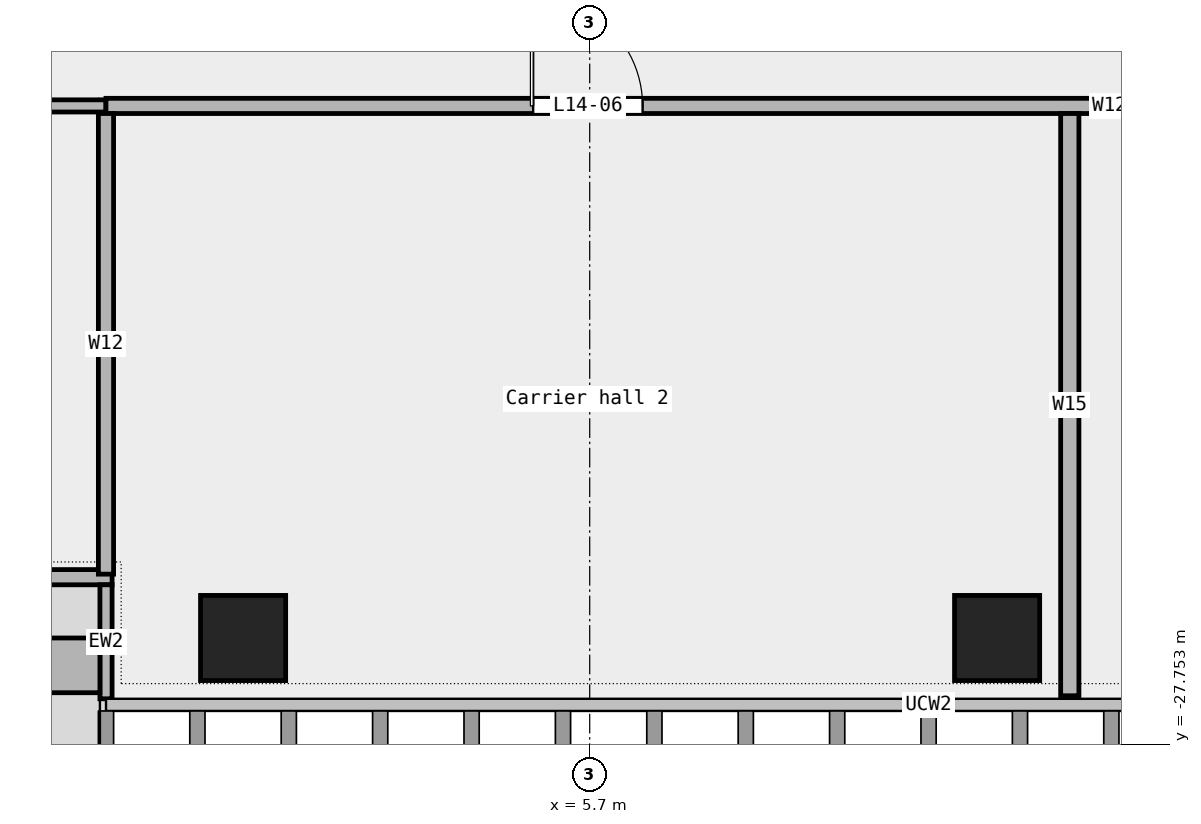
"""IFC4 building model, lengths in metres.
Left out: names, types, materials, properties, quantities, classifications, styles, units other than length and angle.
Written with IfcOpenShell. Run it as: python <this file> out.ifc"""

import sys

from ifc_helpers import new_model, si_unit, direction, frame, frame_2d, origin, origin_2d, place, context, subcontext, project, spatial, rectangle, extrude, element, fill, save


model = new_model("IFC4")
c1 = context("Model", 3, precision=1e-05, world=origin(), true_north=direction((0.0, 1.0)))
c2 = subcontext(c1, "Body", "Model", "MODEL_VIEW")
j1 = project(units=[si_unit("LENGTHUNIT", "METRE"), si_unit("PLANEANGLEUNIT", "RADIAN")], contexts=[c1])
p1 = place(None, origin())
s1 = spatial("IfcSite", under=j1, at=p1, CompositionType="ELEMENT")
p2 = place(p1, origin())
s2 = spatial("IfcBuilding", under=s1, at=p2, CompositionType="ELEMENT")
p3 = place(p2, frame((0.0, 0.0, 74.2)))
s3 = spatial("IfcBuildingStorey", under=s2, at=p3, CompositionType="ELEMENT", Elevation=74.2)
for number, where, z_axis, x_axis in (
    (1, (0.0, -26.0, 0.0), (0.0, 0.0, 1.0), (1.0, 0.0, 0.0)),
    (2, (12.4, -26.0, 0.0), (0.0, 0.0, 1.0), (1.0, 0.0, 0.0)),
):
    element("IfcColumn", number, at=place(p3, frame(where, z_axis=z_axis, x_axis=x_axis)), inside=s3, PredefinedType="COLUMN", context=c2, shape_type="SweptSolid", body=[
        extrude(rectangle(XDim=1.4, YDim=1.4, at=origin_2d()), origin(), (0.0, 0.0, 1.0), 4.35),
    ])
p4 = place(p3, frame((-15.882, -25.0, 0.0), z_axis=(0.0, 0.0, 1.0), x_axis=(1.0, 0.0, 0.0)))
e3 = element("IfcWall", 3, at=p4, inside=s3, PredefinedType="STANDARD", context=c2, shape_type="SweptSolid", body=[
    extrude(rectangle(XDim=13.727, YDim=0.25, at=frame_2d((6.864, 0.0))), origin(), (0.0, 0.0, 1.0), 4.35),
])
p5 = place(p4, frame((1.0, 0.0, 0.45)))
e4 = element("IfcOpeningElement", 4, at=p5, cuts=e3, PredefinedType="OPENING", context=c2, shape_type="SweptSolid", body=[
    extrude(rectangle(XDim=1.5, YDim=3.0, at=frame_2d((0.75, 1.5))), frame((0.0, 0.137, 0.0), z_axis=(0.0, -1.0, 0.0), x_axis=(1.0, 0.0, 0.0)), (0.0, 0.0, 1.0), 0.274),
])
p6 = place(p4, frame((6.0, 0.0, 0.0)))
e5 = element("IfcOpeningElement", 5, at=p6, cuts=e3, PredefinedType="OPENING", context=c2, shape_type="SweptSolid", body=[
    extrude(rectangle(XDim=1.8, YDim=2.4, at=frame_2d((0.9, 1.2))), frame((0.0, 0.137, 0.0), z_axis=(0.0, -1.0, 0.0), x_axis=(1.0, 0.0, 0.0)), (0.0, 0.0, 1.0), 0.274),
])
p7 = place(p4, frame((10.5, 0.0, 0.45)))
e6 = element("IfcOpeningElement", 6, at=p7, cuts=e3, PredefinedType="OPENING", context=c2, shape_type="SweptSolid", body=[
    extrude(rectangle(XDim=1.5, YDim=3.0, at=frame_2d((0.75, 1.5))), frame((0.0, 0.137, 0.0), z_axis=(0.0, -1.0, 0.0), x_axis=(1.0, 0.0, 0.0)), (0.0, 0.0, 1.0), 0.274),
])
p8 = place(p3, frame((-2.255, -27.0, 0.0), z_axis=(0.0, 0.0, 1.0), x_axis=(0.0, 1.0, 0.0)))
e7 = element("IfcWall", 7, at=p8, inside=s3, PredefinedType="STANDARD", context=c2, shape_type="SweptSolid", body=[
    extrude(rectangle(XDim=1.875, YDim=0.2, at=frame_2d((0.938, 0.0))), origin(), (0.0, 0.0, 1.0), 4.35),
])
p9 = place(p3, frame((-5.955, -26.45, 0.0), z_axis=(0.0, 0.0, 1.0), x_axis=(1.0, 0.0, 0.0)))
e8 = element("IfcWall", 8, at=p9, inside=s3, PredefinedType="STANDARD", context=c2, shape_type="SweptSolid", body=[
    extrude(rectangle(XDim=3.6, YDim=0.9, at=frame_2d((1.8, 0.0))), origin(), (0.0, 0.0, 1.0), 0.7),
])
p10 = place(p3, frame((-15.78, -17.25, 0.0), z_axis=(0.0, 0.0, 1.0), x_axis=(1.0, 0.0, 0.0)))
e9 = element("IfcWall", 9, at=p10, inside=s3, PredefinedType="PARTITIONING", context=c2, shape_type="SweptSolid", body=[
    extrude(rectangle(XDim=13.525, YDim=0.2, at=frame_2d((6.763, 0.0))), origin(), (0.0, 0.0, 1.0), 4.35),
])
p11 = place(p10, frame((6.012, 0.0, 0.0)))
e10 = element("IfcOpeningElement", 10, at=p11, cuts=e9, PredefinedType="OPENING", context=c2, shape_type="SweptSolid", body=[
    extrude(rectangle(XDim=1.5, YDim=2.1, at=frame_2d((0.75, 1.05))), frame((0.0, 0.112, 0.0), z_axis=(0.0, -1.0, 0.0), x_axis=(1.0, 0.0, 0.0)), (0.0, 0.0, 1.0), 0.224),
])
p12 = place(p3, frame((-2.255, -17.25, 0.0), z_axis=(0.0, 0.0, 1.0), x_axis=(1.0, 0.0, 0.0)))
e11 = element("IfcWall", 11, at=p12, inside=s3, PredefinedType="PARTITIONING", context=c2, shape_type="SweptSolid", body=[
    extrude(rectangle(XDim=33.005, YDim=0.25, at=frame_2d((16.502, 0.0))), origin(), (0.0, 0.0, 1.0), 4.35),
])
p13 = place(p12, frame((7.025, 0.0, 0.0)))
e12 = element("IfcOpeningElement", 12, at=p13, cuts=e11, PredefinedType="OPENING", context=c2, shape_type="SweptSolid", body=[
    extrude(rectangle(XDim=1.8, YDim=2.1, at=frame_2d((0.9, 1.05))), frame((0.0, 0.137, 0.0), z_axis=(0.0, -1.0, 0.0), x_axis=(1.0, 0.0, 0.0)), (0.0, 0.0, 1.0), 0.274),
])
p14 = place(p12, frame((23.427, 0.0, 0.0)))
e13 = element("IfcOpeningElement", 13, at=p14, cuts=e11, PredefinedType="OPENING", context=c2, shape_type="SweptSolid", body=[
    extrude(rectangle(XDim=1.8, YDim=2.1, at=frame_2d((0.9, 1.05))), frame((0.0, 0.137, 0.0), z_axis=(0.0, -1.0, 0.0), x_axis=(1.0, 0.0, 0.0)), (0.0, 0.0, 1.0), 0.274),
])
p15 = place(p3, frame((-2.255, -24.95, 0.0), z_axis=(0.0, 0.0, 1.0), x_axis=(0.0, 1.0, 0.0)))
e14 = element("IfcWall", 14, at=p15, inside=s3, PredefinedType="PARTITIONING", context=c2, shape_type="SweptSolid", body=[
    extrude(rectangle(XDim=7.575, YDim=0.25, at=frame_2d((3.788, 0.0))), origin(), (0.0, 0.0, 1.0), 4.35),
])
p16 = place(p3, frame((13.595, -26.95, 0.0), z_axis=(0.0, 0.0, 1.0), x_axis=(0.0, 1.0, 0.0)))
e15 = element("IfcWall", 15, at=p16, inside=s3, PredefinedType="PARTITIONING", context=c2, shape_type="SweptSolid", body=[
    extrude(rectangle(XDim=9.575, YDim=0.3, at=frame_2d((4.788, 0.0))), origin(), (0.0, 0.0, 1.0), 4.35),
])
p17 = place(p13, origin())
e16 = element("IfcDoor", 16, at=p17, inside=s3, OperationType="DOUBLE_DOOR_SINGLE_SWING", PredefinedType="DOOR", context=c2, shape_type="SweptSolid", body=[
    extrude(rectangle(XDim=1.8, YDim=2.1, at=frame_2d((0.9, 1.05))), frame((0.0, 0.025, 0.0), z_axis=(0.0, -1.0, 0.0), x_axis=(1.0, 0.0, 0.0)), (0.0, 0.0, 1.0), 0.05),
])
fill(e12, e16)
save(model, sys.argv[1])
